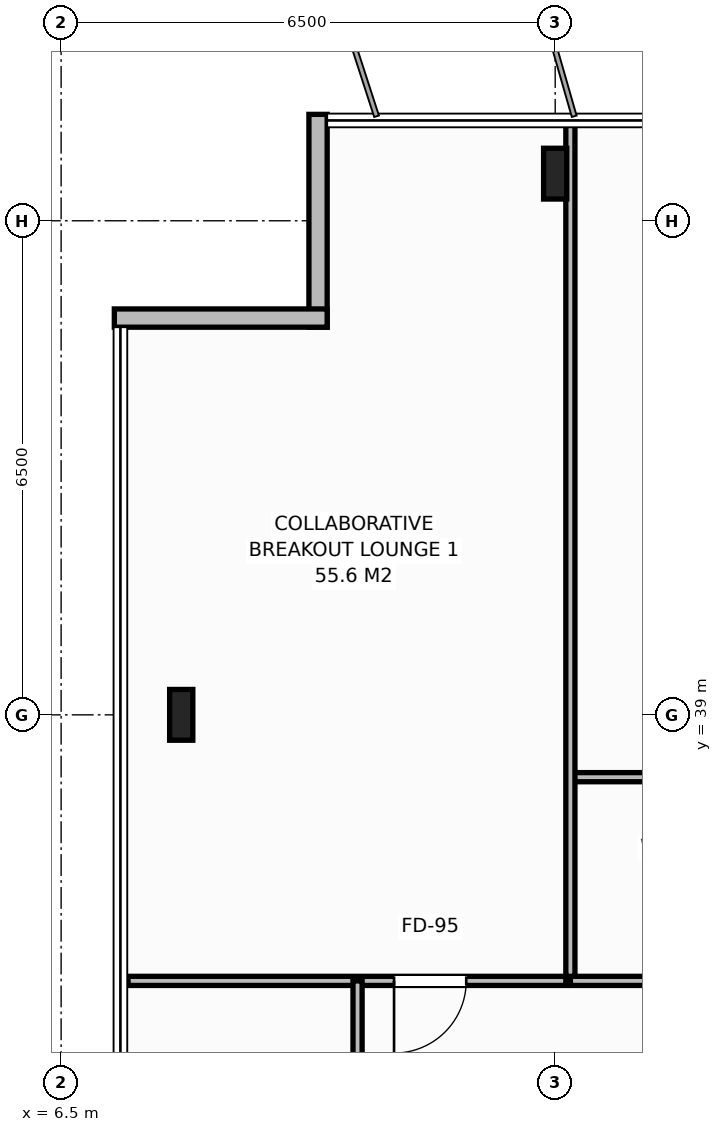
"""IFC4 building model, lengths in metres.
Left out: names, types, materials, properties, quantities, classifications, styles, units other than length and angle.
Written with IfcOpenShell. Run it as: python <this file> out.ifc"""

import sys

from ifc_helpers import new_model, si_unit, direction, frame, frame_2d, origin, origin_2d, place, context, subcontext, project, spatial, rectangle, i_section, extrude, element, fill, save


model = new_model("IFC4")
c1 = context("Model", 3, precision=1e-05, world=origin(), true_north=direction((0.0, 1.0)))
c2 = subcontext(c1, "Body", "Model", "MODEL_VIEW")
j1 = project(units=[si_unit("LENGTHUNIT", "METRE"), si_unit("PLANEANGLEUNIT", "RADIAN")], contexts=[c1])
p1 = place(None, origin())
s1 = spatial("IfcSite", under=j1, at=p1, CompositionType="ELEMENT")
p2 = place(p1, origin())
s2 = spatial("IfcBuilding", under=s1, at=p2, CompositionType="ELEMENT")
p3 = place(p2, frame((0.0, 0.0, 259.4)))
s3 = spatial("IfcBuildingStorey", under=s2, at=p3, CompositionType="ELEMENT", Elevation=259.4)
for number, where, z_axis, x_axis in (
    (1, (13.0, 46.12, 0.0), (0.0, 0.0, 1.0), (1.0, 0.0, 0.0)),
    (2, (8.08, 39.0, 0.0), (0.0, 0.0, 1.0), (1.0, 0.0, 0.0)),
):
    element("IfcColumn", number, at=place(p3, frame(where, z_axis=z_axis, x_axis=x_axis)), inside=s3, PredefinedType="COLUMN", context=c2, shape_type="SweptSolid", body=[
        extrude(i_section(OverallWidth=0.305, OverallDepth=0.668, WebThickness=0.021, FlangeThickness=0.04, at=origin_2d()), origin(), (0.0, 0.0, 1.0), 3.8),
    ])
p4 = place(p3, frame((9.88, 44.1, 0.0), z_axis=(0.0, 0.0, 1.0), x_axis=(0.0, 1.0, 0.0)))
e3 = element("IfcWall", 3, at=p4, inside=s3, PredefinedType="STANDARD", context=c2, shape_type="SweptSolid", body=[
    extrude(rectangle(XDim=2.8, YDim=0.24, at=frame_2d((1.4, 0.0))), origin(), (0.0, 0.0, 1.0), 3.588),
])
p5 = place(p3, frame((7.2, 44.22, 0.0), z_axis=(0.0, 0.0, 1.0), x_axis=(1.0, 0.0, 0.0)))
e4 = element("IfcWall", 4, at=p5, inside=s3, PredefinedType="STANDARD", context=c2, shape_type="SweptSolid", body=[
    extrude(rectangle(XDim=2.8, YDim=0.24, at=frame_2d((1.4, 0.0))), origin(), (0.0, 0.0, 1.0), 3.588),
])
p6 = place(p3, frame((13.2, 35.5, 0.0), z_axis=(0.0, 0.0, 1.0), x_axis=(1.0, 0.0, 0.0)))
e5 = element("IfcWall", 5, at=p6, inside=s3, PredefinedType="PARTITIONING", context=c2, shape_type="SweptSolid", body=[
    extrude(rectangle(XDim=13.16, YDim=0.12, at=frame_2d((6.58, 0.0))), origin(), (0.0, 0.0, 1.0), 3.588),
])
p7 = place(p6, frame((1.35, 0.0, 0.0)))
e6 = element("IfcOpeningElement", 6, at=p7, cuts=e5, PredefinedType="OPENING", context=c2, shape_type="SweptSolid", body=[
    extrude(rectangle(XDim=0.9, YDim=2.15, at=frame_2d((0.45, 1.075))), frame((0.0, 0.07, 0.0), z_axis=(0.0, -1.0, 0.0), x_axis=(1.0, 0.0, 0.0)), (0.0, 0.0, 1.0), 0.14),
])
p8 = place(p6, frame((4.05, 0.0, 0.0)))
e7 = element("IfcOpeningElement", 7, at=p8, cuts=e5, PredefinedType="OPENING", context=c2, shape_type="SweptSolid", body=[
    extrude(rectangle(XDim=0.9, YDim=2.15, at=frame_2d((0.45, 1.075))), frame((0.0, 0.07, 0.0), z_axis=(0.0, -1.0, 0.0), x_axis=(1.0, 0.0, 0.0)), (0.0, 0.0, 1.0), 0.14),
])
p9 = place(p6, frame((8.25, 0.0, 0.0)))
e8 = element("IfcOpeningElement", 8, at=p9, cuts=e5, PredefinedType="OPENING", context=c2, shape_type="SweptSolid", body=[
    extrude(rectangle(XDim=0.9, YDim=2.15, at=frame_2d((0.45, 1.075))), frame((0.0, 0.07, 0.0), z_axis=(0.0, -1.0, 0.0), x_axis=(1.0, 0.0, 0.0)), (0.0, 0.0, 1.0), 0.14),
])
p10 = place(p6, frame((11.0, 0.0, 0.0)))
e9 = element("IfcOpeningElement", 9, at=p10, cuts=e5, PredefinedType="OPENING", context=c2, shape_type="SweptSolid", body=[
    extrude(rectangle(XDim=0.95, YDim=2.15, at=frame_2d((0.475, 1.075))), frame((0.0, 0.07, 0.0), z_axis=(0.0, -1.0, 0.0), x_axis=(1.0, 0.0, 0.0)), (0.0, 0.0, 1.0), 0.14),
])
p11 = place(p3, frame((13.2, 38.18, 0.0), z_axis=(0.0, 0.0, 1.0), x_axis=(1.0, 0.0, 0.0)))
e10 = element("IfcWall", 10, at=p11, inside=s3, PredefinedType="PARTITIONING", context=c2, shape_type="SweptSolid", body=[
    extrude(rectangle(XDim=13.16, YDim=0.12, at=frame_2d((6.58, 0.0))), origin(), (0.0, 0.0, 1.0), 3.588),
])
p12 = place(p3, frame((13.2, 35.56, 0.0), z_axis=(0.0, 0.0, 1.0), x_axis=(0.0, 1.0, 0.0)))
e11 = element("IfcWall", 11, at=p12, inside=s3, PredefinedType="PARTITIONING", context=c2, shape_type="SweptSolid", body=[
    extrude(rectangle(XDim=11.32, YDim=0.12, at=frame_2d((5.66, 0.0))), origin(), (0.0, 0.0, 1.0), 2.788),
])
p13 = place(p3, frame((7.38, 35.5, 0.0), z_axis=(0.0, 0.0, 1.0), x_axis=(1.0, 0.0, 0.0)))
e12 = element("IfcWall", 12, at=p13, inside=s3, PredefinedType="PARTITIONING", context=c2, shape_type="SweptSolid", body=[
    extrude(rectangle(XDim=5.76, YDim=0.12, at=frame_2d((2.88, 0.0))), origin(), (0.0, 0.0, 1.0), 3.588),
])
p14 = place(p13, frame((3.5, 0.0, 0.0)))
e13 = element("IfcOpeningElement", 13, at=p14, cuts=e12, PredefinedType="OPENING", context=c2, shape_type="SweptSolid", body=[
    extrude(rectangle(XDim=0.95, YDim=2.15, at=frame_2d((0.475, 1.075))), frame((0.0, 0.07, 0.0), z_axis=(0.0, -1.0, 0.0), x_axis=(1.0, 0.0, 0.0)), (0.0, 0.0, 1.0), 0.14),
])
p15 = place(p3, frame((10.4, 29.167, 0.0), z_axis=(0.0, 0.0, 1.0), x_axis=(0.0, 1.0, 0.0)))
e14 = element("IfcWall", 14, at=p15, inside=s3, PredefinedType="PARTITIONING", context=c2, shape_type="SweptSolid", body=[
    extrude(rectangle(XDim=6.333, YDim=0.12, at=frame_2d((3.167, 0.0))), origin(), (0.0, 0.0, 1.0), 3.588),
])
p16 = place(p15, frame((1.642, 0.0, 0.0)))
e15 = element("IfcOpeningElement", 15, at=p16, cuts=e14, PredefinedType="OPENING", context=c2, shape_type="SweptSolid", body=[
    extrude(rectangle(XDim=0.95, YDim=2.15, at=frame_2d((0.475, 1.075))), frame((0.0, 0.07, 0.0), z_axis=(0.0, -1.0, 0.0), x_axis=(1.0, 0.0, 0.0)), (0.0, 0.0, 1.0), 0.14),
])
p17 = place(p14, origin())
e16 = element("IfcDoor", 16, at=p17, inside=s3, OperationType="SINGLE_SWING_RIGHT", PredefinedType="DOOR", context=c2, shape_type="SweptSolid", body=[
    extrude(rectangle(XDim=0.95, YDim=2.15, at=frame_2d((0.475, 1.075))), frame((0.0, 0.025, 0.0), z_axis=(0.0, -1.0, 0.0), x_axis=(1.0, 0.0, 0.0)), (0.0, 0.0, 1.0), 0.05),
])
fill(e13, e16)
save(model, sys.argv[1])
